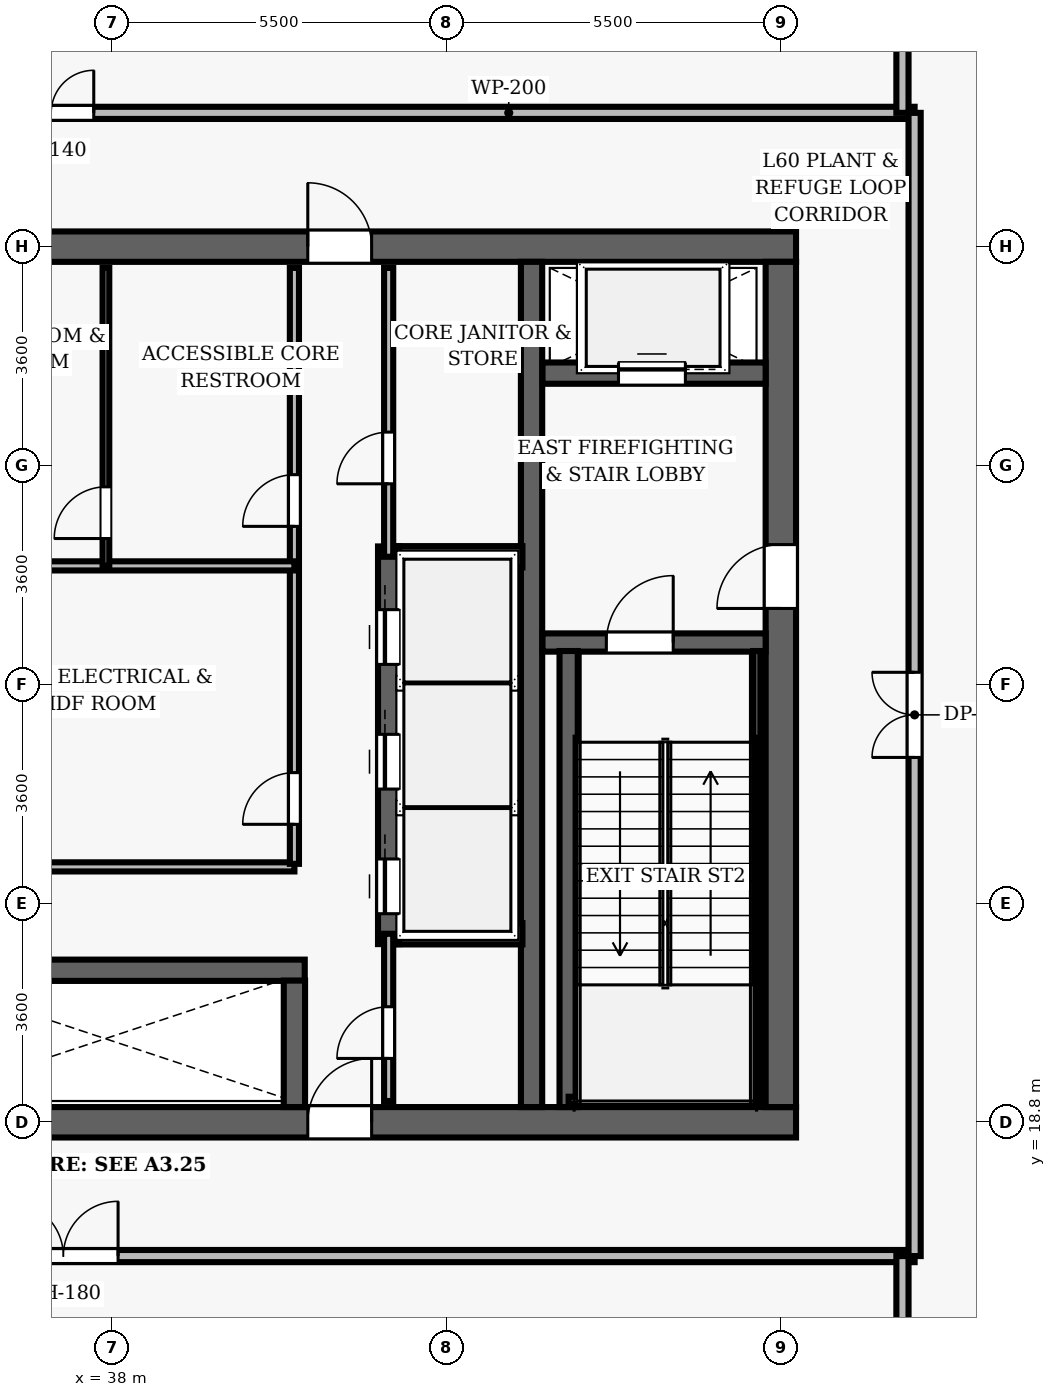
"""IFC4 building model, lengths in metres.
Left out: names, types, materials, properties, quantities, classifications, styles, units other than length and angle.
Written with IfcOpenShell. Run it as: python <this file> out.ifc"""

import sys

from ifc_helpers import new_model, si_unit, direction, frame, frame_2d, origin, place, context, subcontext, project, spatial, rectangle, extrude, element, fill, save


model = new_model("IFC4")
c1 = context("Model", 3, precision=1e-05, world=origin(), true_north=direction((0.0, 1.0)))
c2 = subcontext(c1, "Body", "Model", "MODEL_VIEW")
j1 = project(units=[si_unit("LENGTHUNIT", "METRE"), si_unit("PLANEANGLEUNIT", "RADIAN")], contexts=[c1])
p1 = place(None, origin())
s1 = spatial("IfcSite", under=j1, at=p1, CompositionType="ELEMENT")
p2 = place(p1, origin())
s2 = spatial("IfcBuilding", under=s1, at=p2, CompositionType="ELEMENT")
p3 = place(p2, frame((0.0, 0.0, 236.65)))
s3 = spatial("IfcBuildingStorey", under=s2, at=p3, CompositionType="ELEMENT", Elevation=236.65)
p4 = place(p3, frame((26.75, 18.8, 0.0), z_axis=(0.0, 0.0, 1.0), x_axis=(1.0, 0.0, 0.0)))
e1 = element("IfcWall", 1, at=p4, inside=s3, PredefinedType="SHEAR", context=c2, shape_type="SweptSolid", body=[
    extrude(rectangle(XDim=22.5, YDim=0.5, at=frame_2d((11.25, 0.0))), origin(), (0.0, 0.0, 1.0), 5.4),
])
p5 = place(p4, frame((14.47, 0.0, 0.0)))
e2 = element("IfcOpeningElement", 2, at=p5, cuts=e1, PredefinedType="OPENING", context=c2, shape_type="SweptSolid", body=[
    extrude(rectangle(XDim=1.05, YDim=2.15, at=frame_2d((0.525, 1.075))), frame((0.0, 0.26, 0.0), z_axis=(0.0, -1.0, 0.0), x_axis=(1.0, 0.0, 0.0)), (0.0, 0.0, 1.0), 0.52),
])
p6 = place(p3, frame((26.75, 33.2, 0.0), z_axis=(0.0, 0.0, 1.0), x_axis=(1.0, 0.0, 0.0)))
e3 = element("IfcWall", 3, at=p6, inside=s3, PredefinedType="SHEAR", context=c2, shape_type="SweptSolid", body=[
    extrude(rectangle(XDim=22.5, YDim=0.5, at=frame_2d((11.25, 0.0))), origin(), (0.0, 0.0, 1.0), 5.4),
])
p7 = place(p6, frame((4.57, 0.0, 0.0)))
e4 = element("IfcOpeningElement", 4, at=p7, cuts=e3, PredefinedType="OPENING", context=c2, shape_type="SweptSolid", body=[
    extrude(rectangle(XDim=1.05, YDim=2.15, at=frame_2d((0.525, 1.075))), frame((0.0, 0.26, 0.0), z_axis=(0.0, -1.0, 0.0), x_axis=(1.0, 0.0, 0.0)), (0.0, 0.0, 1.0), 0.52),
])
p8 = place(p6, frame((14.47, 0.0, 0.0)))
e5 = element("IfcOpeningElement", 5, at=p8, cuts=e3, PredefinedType="OPENING", context=c2, shape_type="SweptSolid", body=[
    extrude(rectangle(XDim=1.05, YDim=2.15, at=frame_2d((0.525, 1.075))), frame((0.0, 0.26, 0.0), z_axis=(0.0, -1.0, 0.0), x_axis=(1.0, 0.0, 0.0)), (0.0, 0.0, 1.0), 0.52),
])
p9 = place(p3, frame((49.0, 19.05, 0.0), z_axis=(0.0, 0.0, 1.0), x_axis=(0.0, 1.0, 0.0)))
e6 = element("IfcWall", 6, at=p9, inside=s3, PredefinedType="SHEAR", context=c2, shape_type="SweptSolid", body=[
    extrude(rectangle(XDim=13.9, YDim=0.5, at=frame_2d((6.95, 0.0))), origin(), (0.0, 0.0, 1.0), 5.4),
])
p10 = place(p9, frame((8.2, 0.0, 0.0)))
e7 = element("IfcOpeningElement", 7, at=p10, cuts=e6, PredefinedType="OPENING", context=c2, shape_type="SweptSolid", body=[
    extrude(rectangle(XDim=1.05, YDim=2.15, at=frame_2d((0.525, 1.075))), frame((0.0, 0.26, 0.0), z_axis=(0.0, -1.0, 0.0), x_axis=(1.0, 0.0, 0.0)), (0.0, 0.0, 1.0), 0.52),
])
p11 = place(p3, frame((44.9, 19.05, 0.0), z_axis=(0.0, 0.0, 1.0), x_axis=(0.0, 1.0, 0.0)))
e8 = element("IfcWall", 8, at=p11, inside=s3, PredefinedType="SHEAR", context=c2, shape_type="SweptSolid", body=[
    extrude(rectangle(XDim=13.9, YDim=0.35, at=frame_2d((6.95, 0.0))), origin(), (0.0, 0.0, 1.0), 5.4),
])
p12 = place(p3, frame((45.08, 26.69, 0.0), z_axis=(0.0, 0.0, 1.0), x_axis=(1.0, 0.0, 0.0)))
e9 = element("IfcWall", 9, at=p12, inside=s3, PredefinedType="SHEAR", context=c2, shape_type="SweptSolid", body=[
    extrude(rectangle(XDim=3.67, YDim=0.3, at=frame_2d((1.835, 0.0))), origin(), (0.0, 0.0, 1.0), 5.4),
])
p13 = place(p12, frame((1.05, 0.0, 0.0)))
e10 = element("IfcOpeningElement", 10, at=p13, cuts=e9, PredefinedType="OPENING", context=c2, shape_type="SweptSolid", body=[
    extrude(rectangle(XDim=1.1, YDim=2.15, at=frame_2d((0.55, 1.075))), frame((0.0, 0.16, 0.0), z_axis=(0.0, -1.0, 0.0), x_axis=(1.0, 0.0, 0.0)), (0.0, 0.0, 1.0), 0.32),
])
p14 = place(p3, frame((45.51, 19.05, 0.0), z_axis=(0.0, 0.0, 1.0), x_axis=(0.0, 1.0, 0.0)))
e11 = element("IfcWall", 11, at=p14, inside=s3, PredefinedType="SHEAR", context=c2, shape_type="SweptSolid", body=[
    extrude(rectangle(XDim=7.5, YDim=0.3, at=frame_2d((3.75, 0.0))), origin(), (0.0, 0.0, 1.0), 5.4),
])
p15 = place(p3, frame((48.605, 19.1, 0.0), z_axis=(0.0, 0.0, 1.0), x_axis=(0.0, 1.0, 0.0)))
e12 = element("IfcWall", 12, at=p15, inside=s3, PredefinedType="SHEAR", context=c2, shape_type="SweptSolid", body=[
    extrude(rectangle(XDim=7.45, YDim=0.12, at=frame_2d((3.725, 0.0))), origin(), (0.0, 0.0, 1.0), 5.4),
])
p16 = place(p3, frame((45.51, 19.16, 0.0), z_axis=(0.0, 0.0, 1.0), x_axis=(1.0, 0.0, 0.0)))
e13 = element("IfcWall", 13, at=p16, inside=s3, PredefinedType="SHEAR", context=c2, shape_type="SweptSolid", body=[
    extrude(rectangle(XDim=3.095, YDim=0.12, at=frame_2d((1.547, 0.0))), origin(), (0.0, 0.0, 1.0), 5.4),
])
p17 = place(p3, frame((45.08, 31.12, 0.0), z_axis=(0.0, 0.0, 1.0), x_axis=(1.0, 0.0, 0.0)))
e14 = element("IfcWall", 14, at=p17, inside=s3, PredefinedType="SHEAR", context=c2, shape_type="SweptSolid", body=[
    extrude(rectangle(XDim=3.67, YDim=0.35, at=frame_2d((1.835, 0.0))), origin(), (0.0, 0.0, 1.0), 4.04),
])
p18 = place(p17, frame((1.25, 0.0, 0.0)))
e15 = element("IfcOpeningElement", 15, at=p18, cuts=e14, PredefinedType="OPENING", context=c2, shape_type="SweptSolid", body=[
    extrude(rectangle(XDim=1.1, YDim=2.15, at=frame_2d((0.55, 1.075))), frame((0.0, 0.185, 0.0), z_axis=(0.0, -1.0, 0.0), x_axis=(1.0, 0.0, 0.0)), (0.0, 0.0, 1.0), 0.37),
])
p19 = place(p3, frame((42.55, 21.73, 0.0), z_axis=(0.0, 0.0, 1.0), x_axis=(0.0, 1.0, 0.0)))
e16 = element("IfcWall", 16, at=p19, inside=s3, PredefinedType="SHEAR", context=c2, shape_type="SweptSolid", body=[
    extrude(rectangle(XDim=6.54, YDim=0.35, at=frame_2d((3.27, 0.0))), origin(), (0.0, 0.0, 1.0), 4.04),
])
p20 = place(p19, frame((0.5, 0.0, 0.0)))
e17 = element("IfcOpeningElement", 17, at=p20, cuts=e16, PredefinedType="OPENING", context=c2, shape_type="SweptSolid", body=[
    extrude(rectangle(XDim=0.9, YDim=2.15, at=frame_2d((0.45, 1.075))), frame((0.0, 0.185, 0.0), z_axis=(0.0, -1.0, 0.0), x_axis=(1.0, 0.0, 0.0)), (0.0, 0.0, 1.0), 0.37),
])
p21 = place(p19, frame((2.55, 0.0, 0.0)))
e18 = element("IfcOpeningElement", 18, at=p21, cuts=e16, PredefinedType="OPENING", context=c2, shape_type="SweptSolid", body=[
    extrude(rectangle(XDim=0.9, YDim=2.15, at=frame_2d((0.45, 1.075))), frame((0.0, 0.185, 0.0), z_axis=(0.0, -1.0, 0.0), x_axis=(1.0, 0.0, 0.0)), (0.0, 0.0, 1.0), 0.37),
])
p22 = place(p19, frame((4.6, 0.0, 0.0)))
e19 = element("IfcOpeningElement", 19, at=p22, cuts=e16, PredefinedType="OPENING", context=c2, shape_type="SweptSolid", body=[
    extrude(rectangle(XDim=0.9, YDim=2.15, at=frame_2d((0.45, 1.075))), frame((0.0, 0.185, 0.0), z_axis=(0.0, -1.0, 0.0), x_axis=(1.0, 0.0, 0.0)), (0.0, 0.0, 1.0), 0.37),
])
for number, where, z_axis, x_axis in (
    (20, (42.72, 21.9, 0.0), (0.0, 0.0, 1.0), (1.0, 0.0, 0.0)),
    (21, (42.72, 28.1, 0.0), (0.0, 0.0, 1.0), (1.0, 0.0, 0.0)),
):
    element("IfcWall", number, at=place(p3, frame(where, z_axis=z_axis, x_axis=x_axis)), inside=s3, PredefinedType="SHEAR", context=c2, shape_type="SweptSolid", body=[
        extrude(rectangle(XDim=2.03, YDim=0.35, at=frame_2d((1.015, 0.0))), origin(), (0.0, 0.0, 1.0), 4.04),
    ])
p23 = place(p3, frame((34.49, 21.3, 0.0), z_axis=(0.0, 0.0, 1.0), x_axis=(1.0, 0.0, 0.0)))
e22 = element("IfcWall", 22, at=p23, inside=s3, PredefinedType="SHEAR", context=c2, shape_type="SweptSolid", body=[
    extrude(rectangle(XDim=6.68, YDim=0.35, at=frame_2d((3.34, 0.0))), origin(), (0.0, 0.0, 1.0), 4.04),
])
p24 = place(p3, frame((41.0, 19.05, 0.0), z_axis=(0.0, 0.0, 1.0), x_axis=(0.0, 1.0, 0.0)))
e23 = element("IfcWall", 23, at=p24, inside=s3, PredefinedType="SHEAR", context=c2, shape_type="SweptSolid", body=[
    extrude(rectangle(XDim=2.08, YDim=0.35, at=frame_2d((1.04, 0.0))), origin(), (0.0, 0.0, 1.0), 4.04),
])
p25 = place(p3, frame((34.75, 23.0, 0.0), z_axis=(0.0, 0.0, 1.0), x_axis=(1.0, 0.0, 0.0)))
e24 = element("IfcWall", 24, at=p25, inside=s3, PredefinedType="PARTITIONING", context=c2, shape_type="SweptSolid", body=[
    extrude(rectangle(XDim=6.25, YDim=0.15, at=frame_2d((3.125, 0.0))), origin(), (0.0, 0.0, 1.0), 4.04),
])
p26 = place(p3, frame((41.0, 23.05, 0.0), z_axis=(0.0, 0.0, 1.0), x_axis=(0.0, 1.0, 0.0)))
e25 = element("IfcWall", 25, at=p26, inside=s3, PredefinedType="PARTITIONING", context=c2, shape_type="SweptSolid", body=[
    extrude(rectangle(XDim=9.8, YDim=0.15, at=frame_2d((4.9, 0.0))), origin(), (0.0, 0.0, 1.0), 4.04),
])
p27 = place(p26, frame((0.65, 0.0, 0.0)))
e26 = element("IfcOpeningElement", 26, at=p27, cuts=e25, PredefinedType="OPENING", context=c2, shape_type="SweptSolid", body=[
    extrude(rectangle(XDim=0.85, YDim=2.1, at=frame_2d((0.425, 1.05))), frame((0.0, 0.085, 0.0), z_axis=(0.0, -1.0, 0.0), x_axis=(1.0, 0.0, 0.0)), (0.0, 0.0, 1.0), 0.17),
])
p28 = place(p26, frame((5.55, 0.0, 0.0)))
e27 = element("IfcOpeningElement", 27, at=p28, cuts=e25, PredefinedType="OPENING", context=c2, shape_type="SweptSolid", body=[
    extrude(rectangle(XDim=0.85, YDim=2.1, at=frame_2d((0.425, 1.05))), frame((0.0, 0.085, 0.0), z_axis=(0.0, -1.0, 0.0), x_axis=(1.0, 0.0, 0.0)), (0.0, 0.0, 1.0), 0.17),
])
p29 = place(p3, frame((34.75, 27.95, 0.0), z_axis=(0.0, 0.0, 1.0), x_axis=(1.0, 0.0, 0.0)))
e28 = element("IfcWall", 28, at=p29, inside=s3, PredefinedType="PARTITIONING", context=c2, shape_type="SweptSolid", body=[
    extrude(rectangle(XDim=6.25, YDim=0.15, at=frame_2d((3.125, 0.0))), origin(), (0.0, 0.0, 1.0), 4.04),
])
p30 = place(p3, frame((37.9, 27.95, 0.0), z_axis=(0.0, 0.0, 1.0), x_axis=(0.0, 1.0, 0.0)))
e29 = element("IfcWall", 29, at=p30, inside=s3, PredefinedType="PARTITIONING", context=c2, shape_type="SweptSolid", body=[
    extrude(rectangle(XDim=4.9, YDim=0.11, at=frame_2d((2.45, 0.0))), origin(), (0.0, 0.0, 1.0), 4.04),
])
p31 = place(p30, frame((0.45, 0.0, 0.0)))
e30 = element("IfcOpeningElement", 30, at=p31, cuts=e29, PredefinedType="OPENING", context=c2, shape_type="SweptSolid", body=[
    extrude(rectangle(XDim=0.85, YDim=2.1, at=frame_2d((0.425, 1.05))), frame((0.0, 0.065, 0.0), z_axis=(0.0, -1.0, 0.0), x_axis=(1.0, 0.0, 0.0)), (0.0, 0.0, 1.0), 0.13),
])
p32 = place(p3, frame((42.55, 28.1, 0.0), z_axis=(0.0, 0.0, 1.0), x_axis=(0.0, 1.0, 0.0)))
e31 = element("IfcWall", 31, at=p32, inside=s3, PredefinedType="PARTITIONING", context=c2, shape_type="SweptSolid", body=[
    extrude(rectangle(XDim=4.75, YDim=0.15, at=frame_2d((2.375, 0.0))), origin(), (0.0, 0.0, 1.0), 4.04),
])
p33 = place(p32, frame((1.2, 0.0, 0.0)))
e32 = element("IfcOpeningElement", 32, at=p33, cuts=e31, PredefinedType="OPENING", context=c2, shape_type="SweptSolid", body=[
    extrude(rectangle(XDim=0.85, YDim=2.1, at=frame_2d((0.425, 1.05))), frame((0.0, 0.085, 0.0), z_axis=(0.0, -1.0, 0.0), x_axis=(1.0, 0.0, 0.0)), (0.0, 0.0, 1.0), 0.17),
])
p34 = place(p3, frame((42.55, 19.15, 0.0), z_axis=(0.0, 0.0, 1.0), x_axis=(0.0, 1.0, 0.0)))
e33 = element("IfcWall", 33, at=p34, inside=s3, PredefinedType="PARTITIONING", context=c2, shape_type="SweptSolid", body=[
    extrude(rectangle(XDim=2.75, YDim=0.15, at=frame_2d((1.375, 0.0))), origin(), (0.0, 0.0, 1.0), 4.04),
])
p35 = place(p34, frame((0.7, 0.0, 0.0)))
e34 = element("IfcOpeningElement", 34, at=p35, cuts=e33, PredefinedType="OPENING", context=c2, shape_type="SweptSolid", body=[
    extrude(rectangle(XDim=0.85, YDim=2.1, at=frame_2d((0.425, 1.05))), frame((0.0, 0.085, 0.0), z_axis=(0.0, -1.0, 0.0), x_axis=(1.0, 0.0, 0.0)), (0.0, 0.0, 1.0), 0.17),
])
p36 = place(p3, frame((24.8, 35.4, 0.0), z_axis=(0.0, 0.0, 1.0), x_axis=(1.0, 0.0, 0.0)))
e35 = element("IfcWall", 35, at=p36, inside=s3, PredefinedType="PARTITIONING", context=c2, shape_type="SweptSolid", body=[
    extrude(rectangle(XDim=26.4, YDim=0.2, at=frame_2d((13.2, 0.0))), origin(), (0.0, 0.0, 1.0), 4.04),
])
p37 = place(p36, frame((11.5, 0.0, 0.0)))
e36 = element("IfcOpeningElement", 36, at=p37, cuts=e35, PredefinedType="OPENING", context=c2, shape_type="SweptSolid", body=[
    extrude(rectangle(XDim=1.4, YDim=2.25, at=frame_2d((0.7, 1.125))), frame((0.0, 0.11, 0.0), z_axis=(0.0, -1.0, 0.0), x_axis=(1.0, 0.0, 0.0)), (0.0, 0.0, 1.0), 0.22),
])
p38 = place(p3, frame((24.8, 16.6, 0.0), z_axis=(0.0, 0.0, 1.0), x_axis=(1.0, 0.0, 0.0)))
e37 = element("IfcWall", 37, at=p38, inside=s3, PredefinedType="PARTITIONING", context=c2, shape_type="SweptSolid", body=[
    extrude(rectangle(XDim=26.4, YDim=0.2, at=frame_2d((13.2, 0.0))), origin(), (0.0, 0.0, 1.0), 4.04),
])
p39 = place(p38, frame((11.5, 0.0, 0.0)))
e38 = element("IfcOpeningElement", 38, at=p39, cuts=e37, PredefinedType="OPENING", context=c2, shape_type="SweptSolid", body=[
    extrude(rectangle(XDim=1.8, YDim=2.35, at=frame_2d((0.9, 1.175))), frame((0.0, 0.11, 0.0), z_axis=(0.0, -1.0, 0.0), x_axis=(1.0, 0.0, 0.0)), (0.0, 0.0, 1.0), 0.22),
])
p40 = place(p3, frame((51.2, 16.6, 0.0), z_axis=(0.0, 0.0, 1.0), x_axis=(0.0, 1.0, 0.0)))
e39 = element("IfcWall", 39, at=p40, inside=s3, PredefinedType="PARTITIONING", context=c2, shape_type="SweptSolid", body=[
    extrude(rectangle(XDim=18.8, YDim=0.2, at=frame_2d((9.4, 0.0))), origin(), (0.0, 0.0, 1.0), 4.04),
])
p41 = place(p40, frame((8.2, 0.0, 0.0)))
e40 = element("IfcOpeningElement", 40, at=p41, cuts=e39, PredefinedType="OPENING", context=c2, shape_type="SweptSolid", body=[
    extrude(rectangle(XDim=1.4, YDim=2.25, at=frame_2d((0.7, 1.125))), frame((0.0, 0.11, 0.0), z_axis=(0.0, -1.0, 0.0), x_axis=(1.0, 0.0, 0.0)), (0.0, 0.0, 1.0), 0.22),
])
p42 = place(p3, frame((51.0, 4.674, 0.0), z_axis=(0.0, 0.0, 1.0), x_axis=(0.0, 1.0, 0.0)))
e41 = element("IfcWall", 41, at=p42, inside=s3, PredefinedType="PARTITIONING", context=c2, shape_type="SweptSolid", body=[
    extrude(rectangle(XDim=11.926, YDim=0.2, at=frame_2d((5.963, 0.0))), origin(), (0.0, 0.0, 1.0), 4.04),
])
p43 = place(p3, frame((51.0, 35.4, 0.0), z_axis=(0.0, 0.0, 1.0), x_axis=(0.0, 1.0, 0.0)))
e42 = element("IfcWall", 42, at=p43, inside=s3, PredefinedType="PARTITIONING", context=c2, shape_type="SweptSolid", body=[
    extrude(rectangle(XDim=6.811, YDim=0.2, at=frame_2d((3.406, 0.0))), origin(), (0.0, 0.0, 1.0), 4.04),
])
p44 = place(p13, origin())
e43 = element("IfcDoor", 43, at=p44, inside=s3, OperationType="SINGLE_SWING_RIGHT", PredefinedType="DOOR", context=c2, shape_type="SweptSolid", body=[
    extrude(rectangle(XDim=1.1, YDim=2.15, at=frame_2d((0.55, 1.075))), frame((0.0, 0.025, 0.0), z_axis=(0.0, -1.0, 0.0), x_axis=(1.0, 0.0, 0.0)), (0.0, 0.0, 1.0), 0.05),
])
fill(e10, e43)
p45 = place(p10, origin())
e44 = element("IfcDoor", 44, at=p45, inside=s3, OperationType="SINGLE_SWING_LEFT", PredefinedType="DOOR", context=c2, shape_type="SweptSolid", body=[
    extrude(rectangle(XDim=1.05, YDim=2.15, at=frame_2d((0.525, 1.075))), frame((0.0, 0.025, 0.0), z_axis=(0.0, -1.0, 0.0), x_axis=(1.0, 0.0, 0.0)), (0.0, 0.0, 1.0), 0.05),
])
fill(e7, e44)
p46 = place(p8, origin())
e45 = element("IfcDoor", 45, at=p46, inside=s3, OperationType="SINGLE_SWING_LEFT", PredefinedType="DOOR", context=c2, shape_type="SweptSolid", body=[
    extrude(rectangle(XDim=1.05, YDim=2.15, at=frame_2d((0.525, 1.075))), frame((0.0, 0.025, 0.0), z_axis=(0.0, -1.0, 0.0), x_axis=(1.0, 0.0, 0.0)), (0.0, 0.0, 1.0), 0.05),
])
fill(e5, e45)
p47 = place(p5, origin())
e46 = element("IfcDoor", 46, at=p47, inside=s3, OperationType="SINGLE_SWING_RIGHT", PredefinedType="DOOR", context=c2, shape_type="SweptSolid", body=[
    extrude(rectangle(XDim=1.05, YDim=2.15, at=frame_2d((0.525, 1.075))), frame((0.0, 0.025, 0.0), z_axis=(0.0, -1.0, 0.0), x_axis=(1.0, 0.0, 0.0)), (0.0, 0.0, 1.0), 0.05),
])
fill(e2, e46)
p48 = place(p27, origin())
e47 = element("IfcDoor", 47, at=p48, inside=s3, OperationType="SINGLE_SWING_LEFT", PredefinedType="DOOR", context=c2, shape_type="SweptSolid", body=[
    extrude(rectangle(XDim=0.85, YDim=2.1, at=frame_2d((0.425, 1.05))), frame((0.0, 0.025, 0.0), z_axis=(0.0, -1.0, 0.0), x_axis=(1.0, 0.0, 0.0)), (0.0, 0.0, 1.0), 0.05),
])
fill(e26, e47)
p49 = place(p28, origin())
e48 = element("IfcDoor", 48, at=p49, inside=s3, OperationType="SINGLE_SWING_LEFT", PredefinedType="DOOR", context=c2, shape_type="SweptSolid", body=[
    extrude(rectangle(XDim=0.85, YDim=2.1, at=frame_2d((0.425, 1.05))), frame((0.0, 0.025, 0.0), z_axis=(0.0, -1.0, 0.0), x_axis=(1.0, 0.0, 0.0)), (0.0, 0.0, 1.0), 0.05),
])
fill(e27, e48)
p50 = place(p31, origin())
e49 = element("IfcDoor", 49, at=p50, inside=s3, OperationType="SINGLE_SWING_LEFT", PredefinedType="DOOR", context=c2, shape_type="SweptSolid", body=[
    extrude(rectangle(XDim=0.85, YDim=2.1, at=frame_2d((0.425, 1.05))), frame((0.0, 0.025, 0.0), z_axis=(0.0, -1.0, 0.0), x_axis=(1.0, 0.0, 0.0)), (0.0, 0.0, 1.0), 0.05),
])
fill(e30, e49)
p51 = place(p33, origin())
e50 = element("IfcDoor", 50, at=p51, inside=s3, OperationType="SINGLE_SWING_LEFT", PredefinedType="DOOR", context=c2, shape_type="SweptSolid", body=[
    extrude(rectangle(XDim=0.85, YDim=2.1, at=frame_2d((0.425, 1.05))), frame((0.0, 0.025, 0.0), z_axis=(0.0, -1.0, 0.0), x_axis=(1.0, 0.0, 0.0)), (0.0, 0.0, 1.0), 0.05),
])
fill(e32, e50)
p52 = place(p35, origin())
e51 = element("IfcDoor", 51, at=p52, inside=s3, OperationType="SINGLE_SWING_LEFT", PredefinedType="DOOR", context=c2, shape_type="SweptSolid", body=[
    extrude(rectangle(XDim=0.85, YDim=2.1, at=frame_2d((0.425, 1.05))), frame((0.0, 0.025, 0.0), z_axis=(0.0, -1.0, 0.0), x_axis=(1.0, 0.0, 0.0)), (0.0, 0.0, 1.0), 0.05),
])
fill(e34, e51)
p53 = place(p39, origin())
e52 = element("IfcDoor", 52, at=p53, inside=s3, OperationType="DOUBLE_DOOR_SINGLE_SWING", PredefinedType="DOOR", context=c2, shape_type="SweptSolid", body=[
    extrude(rectangle(XDim=1.8, YDim=2.35, at=frame_2d((0.9, 1.175))), frame((0.0, 0.025, 0.0), z_axis=(0.0, -1.0, 0.0), x_axis=(1.0, 0.0, 0.0)), (0.0, 0.0, 1.0), 0.05),
])
fill(e38, e52)
p54 = place(p37, origin())
e53 = element("IfcDoor", 53, at=p54, inside=s3, OperationType="DOUBLE_DOOR_SINGLE_SWING", PredefinedType="DOOR", context=c2, shape_type="SweptSolid", body=[
    extrude(rectangle(XDim=1.4, YDim=2.25, at=frame_2d((0.7, 1.125))), frame((0.0, 0.025, 0.0), z_axis=(0.0, -1.0, 0.0), x_axis=(1.0, 0.0, 0.0)), (0.0, 0.0, 1.0), 0.05),
])
fill(e36, e53)
p55 = place(p41, origin())
e54 = element("IfcDoor", 54, at=p55, inside=s3, OperationType="DOUBLE_DOOR_SINGLE_SWING", PredefinedType="DOOR", context=c2, shape_type="SweptSolid", body=[
    extrude(rectangle(XDim=1.4, YDim=2.25, at=frame_2d((0.7, 1.125))), frame((0.0, 0.025, 0.0), z_axis=(0.0, -1.0, 0.0), x_axis=(1.0, 0.0, 0.0)), (0.0, 0.0, 1.0), 0.05),
])
fill(e40, e54)
p56 = place(p20, origin())
e55 = element("IfcDoor", 55, at=p56, inside=s3, OperationType="SLIDING_TO_LEFT", PredefinedType="DOOR", context=c2, shape_type="SweptSolid", body=[
    extrude(rectangle(XDim=0.9, YDim=2.15, at=frame_2d((0.45, 1.075))), frame((0.0, 0.025, 0.0), z_axis=(0.0, -1.0, 0.0), x_axis=(1.0, 0.0, 0.0)), (0.0, 0.0, 1.0), 0.05),
])
fill(e17, e55)
p57 = place(p21, origin())
e56 = element("IfcDoor", 56, at=p57, inside=s3, OperationType="SLIDING_TO_LEFT", PredefinedType="DOOR", context=c2, shape_type="SweptSolid", body=[
    extrude(rectangle(XDim=0.9, YDim=2.15, at=frame_2d((0.45, 1.075))), frame((0.0, 0.025, 0.0), z_axis=(0.0, -1.0, 0.0), x_axis=(1.0, 0.0, 0.0)), (0.0, 0.0, 1.0), 0.05),
])
fill(e18, e56)
p58 = place(p22, origin())
e57 = element("IfcDoor", 57, at=p58, inside=s3, OperationType="SLIDING_TO_LEFT", PredefinedType="DOOR", context=c2, shape_type="SweptSolid", body=[
    extrude(rectangle(XDim=0.9, YDim=2.15, at=frame_2d((0.45, 1.075))), frame((0.0, 0.025, 0.0), z_axis=(0.0, -1.0, 0.0), x_axis=(1.0, 0.0, 0.0)), (0.0, 0.0, 1.0), 0.05),
])
fill(e19, e57)
p59 = place(p18, origin())
e58 = element("IfcDoor", 58, at=p59, inside=s3, OperationType="SLIDING_TO_LEFT", PredefinedType="DOOR", context=c2, shape_type="SweptSolid", body=[
    extrude(rectangle(XDim=1.1, YDim=2.15, at=frame_2d((0.55, 1.075))), frame((0.0, 0.025, 0.0), z_axis=(0.0, -1.0, 0.0), x_axis=(1.0, 0.0, 0.0)), (0.0, 0.0, 1.0), 0.05),
])
fill(e15, e58)
save(model, sys.argv[1])
